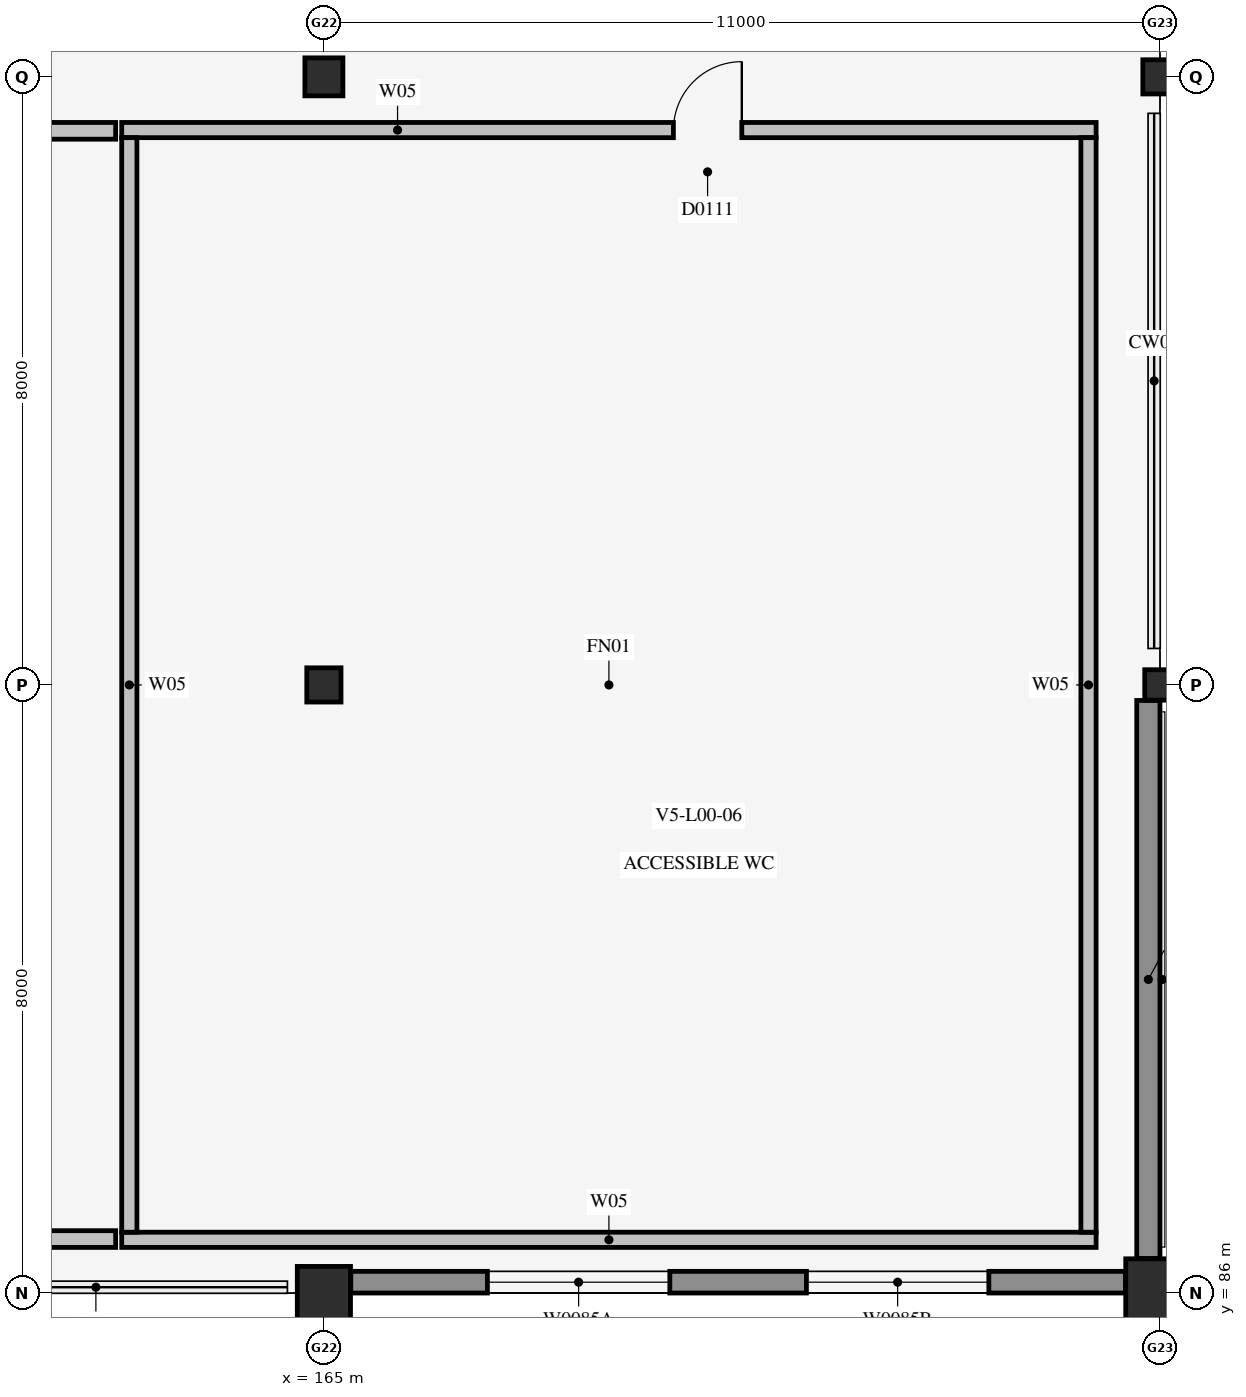
"""IFC4 building model, lengths in metres.
Left out: names, types, materials, properties, quantities, classifications, styles, units other than length and angle.
Written with IfcOpenShell. Run it as: python <this file> out.ifc"""

import sys

from ifc_helpers import new_model, si_unit, direction, frame, frame_2d, origin, origin_2d, place, context, subcontext, project, spatial, rectangle, circle, extrude, element, fill, save


model = new_model("IFC4")
c1 = context("Model", 3, precision=1e-05, world=origin(), true_north=direction((0.0, 1.0)))
c2 = subcontext(c1, "Body", "Model", "MODEL_VIEW")
j1 = project(units=[si_unit("LENGTHUNIT", "METRE"), si_unit("PLANEANGLEUNIT", "RADIAN")], contexts=[c1])
p1 = place(None, origin())
s1 = spatial("IfcSite", under=j1, at=p1, CompositionType="ELEMENT")
p2 = place(p1, origin())
s2 = spatial("IfcBuilding", under=s1, at=p2, CompositionType="ELEMENT")
p3 = place(p2, origin())
s3 = spatial("IfcBuildingStorey", under=s2, at=p3, CompositionType="ELEMENT", Elevation=0.0)
p4 = place(p3, frame((165.0, 86.0, 0.0), z_axis=(0.0, 0.0, 1.0), x_axis=(1.0, 0.0, 0.0)))
e1 = element("IfcColumn", 1, at=p4, inside=s3, PredefinedType="COLUMN", context=c2, shape_type="SweptSolid", body=[
    extrude(circle(Radius=0.35, at=origin_2d()), origin(), (0.0, 0.0, 1.0), 5.4),
])
p5 = place(p3, frame((165.0, 94.0, 0.0), z_axis=(0.0, 0.0, 1.0), x_axis=(1.0, 0.0, 0.0)))
e2 = element("IfcColumn", 2, at=p5, inside=s3, PredefinedType="COLUMN", context=c2, shape_type="SweptSolid", body=[
    extrude(rectangle(XDim=0.45, YDim=0.45, at=origin_2d()), origin(), (0.0, 0.0, 1.0), 5.4),
])
p6 = place(p3, frame((165.0, 102.0, 0.0), z_axis=(0.0, 0.0, 1.0), x_axis=(1.0, 0.0, 0.0)))
e3 = element("IfcColumn", 3, at=p6, inside=s3, PredefinedType="COLUMN", context=c2, shape_type="SweptSolid", body=[
    extrude(rectangle(XDim=0.5, YDim=0.5, at=origin_2d()), origin(), (0.0, 0.0, 1.0), 5.4),
])
p7 = place(p3, frame((176.0, 86.0, 0.0), z_axis=(0.0, 0.0, 1.0), x_axis=(1.0, 0.0, 0.0)))
e4 = element("IfcColumn", 4, at=p7, inside=s3, PredefinedType="COLUMN", context=c2, shape_type="SweptSolid", body=[
    extrude(circle(Radius=0.45, at=origin_2d()), origin(), (0.0, 0.0, 1.0), 5.4),
])
p8 = place(p3, frame((176.0, 94.0, 0.0), z_axis=(0.0, 0.0, 1.0), x_axis=(1.0, 0.0, 0.0)))
e5 = element("IfcColumn", 5, at=p8, inside=s3, PredefinedType="COLUMN", context=c2, shape_type="SweptSolid", body=[
    extrude(rectangle(XDim=0.4, YDim=0.4, at=origin_2d()), origin(), (0.0, 0.0, 1.0), 5.4),
])
p9 = place(p3, frame((176.0, 102.0, 0.0), z_axis=(0.0, 0.0, 1.0), x_axis=(1.0, 0.0, 0.0)))
e6 = element("IfcColumn", 6, at=p9, inside=s3, PredefinedType="COLUMN", context=c2, shape_type="SweptSolid", body=[
    extrude(rectangle(XDim=0.45, YDim=0.45, at=origin_2d()), origin(), (0.0, 0.0, 1.0), 5.4),
])
p10 = place(p3, frame((149.44, 86.71, 0.0), z_axis=(0.0, 0.0, 1.0), x_axis=(1.0, 0.0, 0.0)))
e7 = element("IfcWall", 7, at=p10, inside=s3, PredefinedType="PLUMBINGWALL", context=c2, shape_type="SweptSolid", body=[
    extrude(rectangle(XDim=12.82, YDim=0.22, at=frame_2d((6.41, 0.0))), origin(), (0.0, 0.0, 1.0), 5.125),
])
p11 = place(p3, frame((149.44, 101.29, 0.0), z_axis=(0.0, 0.0, 1.0), x_axis=(1.0, 0.0, 0.0)))
e8 = element("IfcWall", 8, at=p11, inside=s3, PredefinedType="PLUMBINGWALL", context=c2, shape_type="SweptSolid", body=[
    extrude(rectangle(XDim=12.82, YDim=0.22, at=frame_2d((6.41, 0.0))), origin(), (0.0, 0.0, 1.0), 5.125),
])
p12 = place(p11, frame((4.604, 0.0, 0.0)))
e9 = element("IfcOpeningElement", 9, at=p12, cuts=e8, PredefinedType="OPENING", context=c2, shape_type="SweptSolid", body=[
    extrude(rectangle(XDim=1.05, YDim=2.15, at=frame_2d((0.525, 1.075))), frame((0.0, 0.122, 0.0), z_axis=(0.0, -1.0, 0.0), x_axis=(1.0, 0.0, 0.0)), (0.0, 0.0, 1.0), 0.244),
])
p13 = place(p3, frame((162.34, 86.7, 0.0), z_axis=(0.0, 0.0, 1.0), x_axis=(1.0, 0.0, 0.0)))
e10 = element("IfcWall", 10, at=p13, inside=s3, PredefinedType="PLUMBINGWALL", context=c2, shape_type="SweptSolid", body=[
    extrude(rectangle(XDim=12.82, YDim=0.2, at=frame_2d((6.41, 0.0))), origin(), (0.0, 0.0, 1.0), 5.125),
])
p14 = place(p3, frame((162.34, 101.3, 0.0), z_axis=(0.0, 0.0, 1.0), x_axis=(1.0, 0.0, 0.0)))
e11 = element("IfcWall", 11, at=p14, inside=s3, PredefinedType="PLUMBINGWALL", context=c2, shape_type="SweptSolid", body=[
    extrude(rectangle(XDim=12.82, YDim=0.2, at=frame_2d((6.41, 0.0))), origin(), (0.0, 0.0, 1.0), 5.125),
])
p15 = place(p14, frame((7.258, 0.0, 0.0)))
e12 = element("IfcOpeningElement", 12, at=p15, cuts=e11, PredefinedType="OPENING", context=c2, shape_type="SweptSolid", body=[
    extrude(rectangle(XDim=0.9, YDim=2.1, at=frame_2d((0.45, 1.05))), frame((0.0, 0.112, 0.0), z_axis=(0.0, -1.0, 0.0), x_axis=(1.0, 0.0, 0.0)), (0.0, 0.0, 1.0), 0.224),
])
for number, where, z_axis, x_axis in (
    (13, (175.06, 86.8, 0.0), (0.0, 0.0, 1.0), (0.0, 1.0, 0.0)),
    (14, (162.44, 86.8, 0.0), (0.0, 0.0, 1.0), (0.0, 1.0, 0.0)),
):
    element("IfcWall", number, at=place(p3, frame(where, z_axis=z_axis, x_axis=x_axis)), inside=s3, PredefinedType="PLUMBINGWALL", context=c2, shape_type="SweptSolid", body=[
        extrude(rectangle(XDim=14.4, YDim=0.2, at=frame_2d((7.2, 0.0))), origin(), (0.0, 0.0, 1.0), 5.125),
    ])
p16 = place(p3, frame((165.354, 86.143, 0.0), z_axis=(0.0, 0.0, 1.0), x_axis=(1.0, 0.0, 0.0)))
e15 = element("IfcWall", 15, at=p16, inside=s3, PredefinedType="SOLIDWALL", context=c2, shape_type="SweptSolid", body=[
    extrude(rectangle(XDim=10.192, YDim=0.285, at=frame_2d((5.096, 0.0))), origin(), (0.0, 0.0, 1.0), 4.65),
])
p17 = place(p16, frame((1.797, 0.0, 0.95)))
e16 = element("IfcOpeningElement", 16, at=p17, cuts=e15, PredefinedType="OPENING", context=c2, shape_type="SweptSolid", body=[
    extrude(rectangle(XDim=2.4, YDim=2.1, at=frame_2d((1.2, 1.05))), frame((0.0, 0.154, 0.0), z_axis=(0.0, -1.0, 0.0), x_axis=(1.0, 0.0, 0.0)), (0.0, 0.0, 1.0), 0.309),
])
p18 = place(p16, frame((5.995, 0.0, 0.95)))
e17 = element("IfcOpeningElement", 17, at=p18, cuts=e15, PredefinedType="OPENING", context=c2, shape_type="SweptSolid", body=[
    extrude(rectangle(XDim=2.4, YDim=2.1, at=frame_2d((1.2, 1.05))), frame((0.0, 0.154, 0.0), z_axis=(0.0, -1.0, 0.0), x_axis=(1.0, 0.0, 0.0)), (0.0, 0.0, 1.0), 0.309),
])
p19 = place(p3, frame((175.847, 86.454, 0.0), z_axis=(0.0, 0.0, 1.0), x_axis=(0.0, 1.0, 0.0)))
e18 = element("IfcWall", 18, at=p19, inside=s3, PredefinedType="SOLIDWALL", context=c2, shape_type="SweptSolid", body=[
    extrude(rectangle(XDim=7.342, YDim=0.305, at=frame_2d((3.671, 0.0))), origin(), (0.0, 0.0, 1.0), 4.498),
])
p20 = place(p15, frame((0.9, 0.0, 0.0), z_axis=(0.0, 0.0, 1.0), x_axis=(-1.0, 0.0, 0.0)))
e19 = element("IfcDoor", 19, at=p20, inside=s3, OperationType="SINGLE_SWING_RIGHT", PredefinedType="DOOR", context=c2, shape_type="SweptSolid", body=[
    extrude(rectangle(XDim=0.9, YDim=2.1, at=frame_2d((0.45, 1.05))), frame((0.0, 0.025, 0.0), z_axis=(0.0, -1.0, 0.0), x_axis=(1.0, 0.0, 0.0)), (0.0, 0.0, 1.0), 0.05),
])
fill(e12, e19)
p21 = place(p17, origin())
e20 = element("IfcWindow", 20, at=p21, inside=s3, PartitioningType="SINGLE_PANEL", PredefinedType="WINDOW", context=c2, shape_type="SweptSolid", body=[
    extrude(rectangle(XDim=2.4, YDim=2.1, at=frame_2d((1.2, 1.05))), frame((0.0, 0.03, 0.0), z_axis=(0.0, -1.0, 0.0), x_axis=(1.0, 0.0, 0.0)), (0.0, 0.0, 1.0), 0.06),
])
fill(e16, e20)
p22 = place(p18, origin())
e21 = element("IfcWindow", 21, at=p22, inside=s3, PartitioningType="SINGLE_PANEL", PredefinedType="WINDOW", context=c2, shape_type="SweptSolid", body=[
    extrude(rectangle(XDim=2.4, YDim=2.1, at=frame_2d((1.2, 1.05))), frame((0.0, 0.03, 0.0), z_axis=(0.0, -1.0, 0.0), x_axis=(1.0, 0.0, 0.0)), (0.0, 0.0, 1.0), 0.06),
])
fill(e17, e21)
save(model, sys.argv[1])
